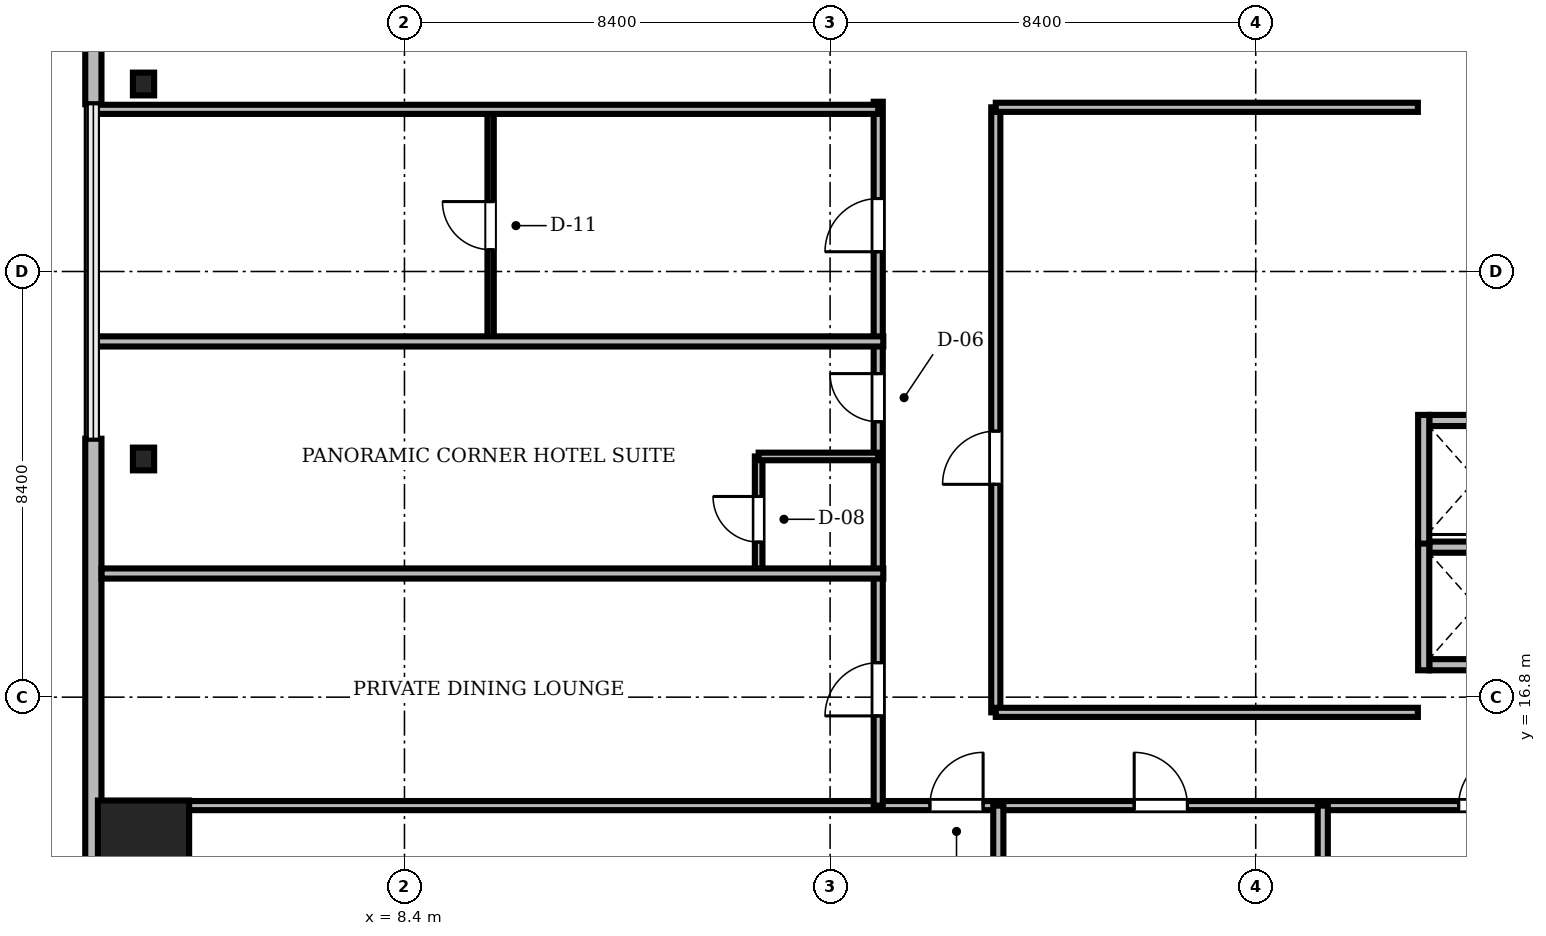
"""IFC4 building model, lengths in metres.
Left out: names, types, materials, properties, quantities, classifications, styles, units other than length and angle.
Written with IfcOpenShell. Run it as: python <this file> out.ifc"""

import sys

from ifc_helpers import new_model, si_unit, direction, frame, frame_2d, origin, origin_2d, place, context, subcontext, project, spatial, rectangle, i_section, extrude, source, transform, mapped, element, fill, save


model = new_model("IFC4")
c1 = context("Model", 3, precision=1e-05, world=origin(), true_north=direction((0.0, 1.0)))
c2 = subcontext(c1, "Body", "Model", "MODEL_VIEW")
j1 = project(units=[si_unit("LENGTHUNIT", "METRE"), si_unit("PLANEANGLEUNIT", "RADIAN")], contexts=[c1])
p1 = place(None, origin())
s1 = spatial("IfcSite", under=j1, at=p1, CompositionType="ELEMENT")
p2 = place(p1, origin())
s2 = spatial("IfcBuilding", under=s1, at=p2, CompositionType="ELEMENT")
p3 = place(p2, frame((0.0, 0.0, 27.6)))
s3 = spatial("IfcBuildingStorey", under=s2, at=p3, CompositionType="ELEMENT", Elevation=27.6)
m1 = source(origin(), c2, "Body", "SweptSolid", [
    extrude(rectangle(XDim=1.8, YDim=1.8, at=origin_2d()), origin(), (0.0, 0.0, 1.0), 3.41),
])
p4 = place(p3, frame((3.25, 13.86, 0.0), z_axis=(0.0, 0.0, 1.0), x_axis=(1.0, 0.0, 0.0)))
e1 = element("IfcColumn", 1, at=p4, inside=s3, PredefinedType="COLUMN", context=c2, shape_type="MappedRepresentation", body=[
    mapped(m1, transform((0.0, 0.0, 0.0), scale=1.0)),
])
m2 = source(origin(), c2, "Body", "SweptSolid", [
    extrude(i_section(OverallWidth=0.419, OverallDepth=0.449, WebThickness=0.031, FlangeThickness=0.048, FilletRadius=0.015, at=origin_2d()), origin(), (0.0, 0.0, 1.0), 3.41),
])
for number, where, z_axis, x_axis in (
    (2, (3.25, 28.9, 0.0), (0.0, 0.0, 1.0), (1.0, 0.0, 0.0)),
    (3, (3.25, 21.5, 0.0), (0.0, 0.0, 1.0), (1.0, 0.0, 0.0)),
):
    element("IfcColumn", number, at=place(p3, frame(where, z_axis=z_axis, x_axis=x_axis)), inside=s3, PredefinedType="COLUMN", context=c2, shape_type="MappedRepresentation", body=[
        mapped(m2, transform((0.0, 0.0, 0.0), scale=1.0)),
    ])
m3 = source(origin(), c2, "Body", "SweptSolid", [
    extrude(rectangle(XDim=15.6, YDim=0.32, at=frame_2d((7.8, 0.0))), origin(), (0.0, 0.0, 1.0), 3.41),
])
p5 = place(p3, frame((2.26, 44.1, 0.0), z_axis=(0.0, 0.0, 1.0), x_axis=(0.0, -1.0, 0.0)))
e4 = element("IfcWall", 4, at=p5, inside=s3, PredefinedType="SOLIDWALL", context=c2, shape_type="MappedRepresentation", body=[
    mapped(m3, transform((0.0, 0.0, 0.0), scale=1.0)),
])
m4 = source(origin(), c2, "Body", "SweptSolid", [
    extrude(rectangle(XDim=1.4, YDim=2.3, at=frame_2d((0.7, 1.15))), frame((0.0, 0.17, 0.0), z_axis=(0.0, -1.0, 0.0), x_axis=(1.0, 0.0, 0.0)), (0.0, 0.0, 1.0), 0.34),
])
p6 = place(p5, frame((9.61, 0.0, 0.0)))
e5 = element("IfcOpeningElement", 5, at=p6, cuts=e4, PredefinedType="OPENING", context=c2, shape_type="MappedRepresentation", body=[
    mapped(m4, transform((0.0, 0.0, 0.0), scale=1.0)),
])
m5 = source(origin(), c2, "Body", "SweptSolid", [
    extrude(rectangle(XDim=2.8, YDim=2.4, at=frame_2d((1.4, 1.2))), frame((0.0, 0.17, 0.0), z_axis=(0.0, -1.0, 0.0), x_axis=(1.0, 0.0, 0.0)), (0.0, 0.0, 1.0), 0.34),
])
p7 = place(p5, frame((2.705, 0.0, 0.72)))
e6 = element("IfcOpeningElement", 6, at=p7, cuts=e4, PredefinedType="OPENING", context=c2, shape_type="MappedRepresentation", body=[
    mapped(m5, transform((0.0, 0.0, 0.0), scale=1.0)),
])
m6 = source(origin(), c2, "Body", "SweptSolid", [
    extrude(rectangle(XDim=15.6, YDim=0.32, at=frame_2d((7.8, 0.0))), origin(), (0.0, 0.0, 1.0), 3.41),
])
p8 = place(p3, frame((2.26, 21.9, 0.0), z_axis=(0.0, 0.0, 1.0), x_axis=(0.0, -1.0, 0.0)))
e7 = element("IfcWall", 7, at=p8, inside=s3, PredefinedType="SOLIDWALL", context=c2, shape_type="MappedRepresentation", body=[
    mapped(m6, transform((0.0, 0.0, 0.0), scale=1.0)),
])
p9 = place(p8, frame((10.095, 0.0, 0.72)))
e8 = element("IfcOpeningElement", 8, at=p9, cuts=e7, PredefinedType="OPENING", context=c2, shape_type="MappedRepresentation", body=[
    mapped(m5, transform((0.0, 0.0, 0.0), scale=1.0)),
])
m7 = source(origin(), c2, "Body", "SweptSolid", [
    extrude(rectangle(XDim=1.85, YDim=0.22, at=frame_2d((0.925, 0.0))), origin(), (0.0, 0.0, 1.0), 3.41),
])
for number, where, z_axis, x_axis in (
    (9, (28.625, 17.44, 0.0), (0.0, 0.0, 1.0), (1.0, 0.0, 0.0)),
    (10, (28.625, 19.76, 0.0), (0.0, 0.0, 1.0), (1.0, 0.0, 0.0)),
):
    element("IfcWall", number, at=place(p3, frame(where, z_axis=z_axis, x_axis=x_axis)), inside=s3, PredefinedType="SOLIDWALL", context=c2, shape_type="MappedRepresentation", body=[
        mapped(m7, transform((0.0, 0.0, 0.0), scale=1.0)),
    ])
m8 = source(origin(), c2, "Body", "SweptSolid", [
    extrude(rectangle(XDim=2.54, YDim=0.22, at=frame_2d((1.27, 0.0))), origin(), (0.0, 0.0, 1.0), 3.41),
])
p10 = place(p3, frame((28.515, 17.33, 0.0), z_axis=(0.0, 0.0, 1.0), x_axis=(0.0, 1.0, 0.0)))
e11 = element("IfcWall", 11, at=p10, inside=s3, PredefinedType="SOLIDWALL", context=c2, shape_type="MappedRepresentation", body=[
    mapped(m8, transform((0.0, 0.0, 0.0), scale=1.0)),
])
p11 = place(p3, frame((28.625, 22.26, 0.0), z_axis=(0.0, 0.0, 1.0), x_axis=(1.0, 0.0, 0.0)))
e12 = element("IfcWall", 12, at=p11, inside=s3, PredefinedType="SOLIDWALL", context=c2, shape_type="MappedRepresentation", body=[
    mapped(m7, transform((0.0, 0.0, 0.0), scale=1.0)),
])
p12 = place(p3, frame((28.515, 19.83, 0.0), z_axis=(0.0, 0.0, 1.0), x_axis=(0.0, 1.0, 0.0)))
e13 = element("IfcWall", 13, at=p12, inside=s3, PredefinedType="SOLIDWALL", context=c2, shape_type="MappedRepresentation", body=[
    mapped(m8, transform((0.0, 0.0, 0.0), scale=1.0)),
])
m9 = source(origin(), c2, "Body", "SweptSolid", [
    extrude(rectangle(XDim=46.156, YDim=0.18, at=frame_2d((23.078, 0.0))), origin(), (0.0, 0.0, 1.0), 2.652),
])
p13 = place(p3, frame((2.422, 14.66, 0.0), z_axis=(0.0, 0.0, 1.0), x_axis=(1.0, 0.0, 0.0)))
e14 = element("IfcWall", 14, at=p13, inside=s3, PredefinedType="PARTITIONING", context=c2, shape_type="MappedRepresentation", body=[
    mapped(m9, transform((0.0, 0.0, 0.0), scale=1.0)),
])
m10 = source(origin(), c2, "Body", "SweptSolid", [
    extrude(rectangle(XDim=1.05, YDim=2.2, at=frame_2d((0.525, 1.1))), frame((0.0, 0.1, 0.0), z_axis=(0.0, -1.0, 0.0), x_axis=(1.0, 0.0, 0.0)), (0.0, 0.0, 1.0), 0.2),
])
p14 = place(p13, frame((16.348, 0.0, 0.0)))
e15 = element("IfcOpeningElement", 15, at=p14, cuts=e14, PredefinedType="OPENING", context=c2, shape_type="MappedRepresentation", body=[
    mapped(m10, transform((0.0, 0.0, 0.0), scale=1.0)),
])
p15 = place(p13, frame((20.38, 0.0, 0.0)))
e16 = element("IfcOpeningElement", 16, at=p15, cuts=e14, PredefinedType="OPENING", context=c2, shape_type="MappedRepresentation", body=[
    mapped(m10, transform((0.0, 0.0, 0.0), scale=1.0)),
])
p16 = place(p13, frame((26.783, 0.0, 0.0)))
e17 = element("IfcOpeningElement", 17, at=p16, cuts=e14, PredefinedType="OPENING", context=c2, shape_type="MappedRepresentation", body=[
    mapped(m10, transform((0.0, 0.0, 0.0), scale=1.0)),
])
p17 = place(p13, frame((33.186, 0.0, 0.0)))
e18 = element("IfcOpeningElement", 18, at=p17, cuts=e14, PredefinedType="OPENING", context=c2, shape_type="MappedRepresentation", body=[
    mapped(m10, transform((0.0, 0.0, 0.0), scale=1.0)),
])
p18 = place(p13, frame((40.998, 0.0, 0.0)))
e19 = element("IfcOpeningElement", 19, at=p18, cuts=e14, PredefinedType="OPENING", context=c2, shape_type="MappedRepresentation", body=[
    mapped(m10, transform((0.0, 0.0, 0.0), scale=1.0)),
])
m11 = source(origin(), c2, "Body", "SweptSolid", [
    extrude(rectangle(XDim=13.89, YDim=0.18, at=frame_2d((6.945, 0.0))), origin(), (0.0, 0.0, 1.0), 2.802),
])
p19 = place(p3, frame((17.75, 14.66, 0.0), z_axis=(0.0, 0.0, 1.0), x_axis=(0.0, 1.0, 0.0)))
e20 = element("IfcWall", 20, at=p19, inside=s3, PredefinedType="PARTITIONING", context=c2, shape_type="MappedRepresentation", body=[
    mapped(m11, transform((0.0, 0.0, 0.0), scale=1.0)),
])
p20 = place(p19, frame((1.77, 0.0, 0.0)))
e21 = element("IfcOpeningElement", 21, at=p20, cuts=e20, PredefinedType="OPENING", context=c2, shape_type="MappedRepresentation", body=[
    mapped(m10, transform((0.0, 0.0, 0.0), scale=1.0)),
])
m12 = source(origin(), c2, "Body", "SweptSolid", [
    extrude(rectangle(XDim=0.95, YDim=2.15, at=frame_2d((0.475, 1.075))), frame((0.0, 0.1, 0.0), z_axis=(0.0, -1.0, 0.0), x_axis=(1.0, 0.0, 0.0)), (0.0, 0.0, 1.0), 0.2),
])
p21 = place(p19, frame((7.575, 0.0, 0.0)))
e22 = element("IfcOpeningElement", 22, at=p21, cuts=e20, PredefinedType="OPENING", context=c2, shape_type="MappedRepresentation", body=[
    mapped(m12, transform((0.0, 0.0, 0.0), scale=1.0)),
])
p22 = place(p19, frame((10.93, 0.0, 0.0)))
e23 = element("IfcOpeningElement", 23, at=p22, cuts=e20, PredefinedType="OPENING", context=c2, shape_type="MappedRepresentation", body=[
    mapped(m10, transform((0.0, 0.0, 0.0), scale=1.0)),
])
m13 = source(origin(), c2, "Body", "SweptSolid", [
    extrude(rectangle(XDim=11.94, YDim=0.18, at=frame_2d((5.97, 0.0))), origin(), (0.0, 0.0, 1.0), 2.802),
])
p23 = place(p3, frame((20.07, 16.5, 0.0), z_axis=(0.0, 0.0, 1.0), x_axis=(0.0, 1.0, 0.0)))
e24 = element("IfcWall", 24, at=p23, inside=s3, PredefinedType="PARTITIONING", context=c2, shape_type="MappedRepresentation", body=[
    mapped(m13, transform((0.0, 0.0, 0.0), scale=1.0)),
])
p24 = place(p23, frame((4.5, 0.0, 0.0)))
e25 = element("IfcOpeningElement", 25, at=p24, cuts=e24, PredefinedType="OPENING", context=c2, shape_type="MappedRepresentation", body=[
    mapped(m10, transform((0.0, 0.0, 0.0), scale=1.0)),
])
m14 = source(origin(), c2, "Body", "SweptSolid", [
    extrude(rectangle(XDim=4.58, YDim=0.125, at=frame_2d((2.29, 0.0))), origin(), (0.0, 0.0, 1.0), 2.802),
])
p25 = place(p3, frame((10.1, 23.82, 0.0), z_axis=(0.0, 0.0, 1.0), x_axis=(0.0, 1.0, 0.0)))
e26 = element("IfcWall", 26, at=p25, inside=s3, PredefinedType="PARTITIONING", context=c2, shape_type="MappedRepresentation", body=[
    mapped(m14, transform((0.0, 0.0, 0.0), scale=1.0)),
])
m15 = source(origin(), c2, "Body", "SweptSolid", [
    extrude(rectangle(XDim=0.95, YDim=2.15, at=frame_2d((0.475, 1.075))), frame((0.0, 0.073, 0.0), z_axis=(0.0, -1.0, 0.0), x_axis=(1.0, 0.0, 0.0)), (0.0, 0.0, 1.0), 0.145),
])
p26 = place(p25, frame((1.81, 0.0, 0.0)))
e27 = element("IfcOpeningElement", 27, at=p26, cuts=e26, PredefinedType="OPENING", context=c2, shape_type="MappedRepresentation", body=[
    mapped(m15, transform((0.0, 0.0, 0.0), scale=1.0)),
])
m16 = source(origin(), c2, "Body", "SweptSolid", [
    extrude(rectangle(XDim=2.29, YDim=0.15, at=frame_2d((1.145, 0.0))), origin(), (0.0, 0.0, 1.0), 2.802),
])
p27 = place(p3, frame((15.39, 19.26, 0.0), z_axis=(0.0, 0.0, 1.0), x_axis=(0.0, 1.0, 0.0)))
e28 = element("IfcWall", 28, at=p27, inside=s3, PredefinedType="PARTITIONING", context=c2, shape_type="MappedRepresentation", body=[
    mapped(m16, transform((0.0, 0.0, 0.0), scale=1.0)),
])
m17 = source(origin(), c2, "Body", "SweptSolid", [
    extrude(rectangle(XDim=0.9, YDim=2.1, at=frame_2d((0.45, 1.05))), frame((0.0, 0.085, 0.0), z_axis=(0.0, -1.0, 0.0), x_axis=(1.0, 0.0, 0.0)), (0.0, 0.0, 1.0), 0.17),
])
p28 = place(p27, frame((0.6, 0.0, 0.0)))
e29 = element("IfcOpeningElement", 29, at=p28, cuts=e28, PredefinedType="OPENING", context=c2, shape_type="MappedRepresentation", body=[
    mapped(m17, transform((0.0, 0.0, 0.0), scale=1.0)),
])
m18 = source(origin(), c2, "Body", "SweptSolid", [
    extrude(rectangle(XDim=15.428, YDim=0.2, at=frame_2d((7.714, 0.0))), origin(), (0.0, 0.0, 1.0), 2.652),
])
p29 = place(p3, frame((2.422, 19.24, 0.0), z_axis=(0.0, 0.0, 1.0), x_axis=(1.0, 0.0, 0.0)))
e30 = element("IfcWall", 30, at=p29, inside=s3, PredefinedType="PARTITIONING", context=c2, shape_type="MappedRepresentation", body=[
    mapped(m18, transform((0.0, 0.0, 0.0), scale=1.0)),
])
m19 = source(origin(), c2, "Body", "SweptSolid", [
    extrude(rectangle(XDim=15.62, YDim=0.2, at=frame_2d((7.81, 0.0))), origin(), (0.0, 0.0, 1.0), 2.652),
])
p30 = place(p3, frame((2.23, 23.82, 0.0), z_axis=(0.0, 0.0, 1.0), x_axis=(1.0, 0.0, 0.0)))
e31 = element("IfcWall", 31, at=p30, inside=s3, PredefinedType="PARTITIONING", context=c2, shape_type="MappedRepresentation", body=[
    mapped(m19, transform((0.0, 0.0, 0.0), scale=1.0)),
])
m20 = source(origin(), c2, "Body", "SweptSolid", [
    extrude(rectangle(XDim=15.52, YDim=0.18, at=frame_2d((7.76, 0.0))), origin(), (0.0, 0.0, 1.0), 2.652),
])
p31 = place(p3, frame((2.23, 28.4, 0.0), z_axis=(0.0, 0.0, 1.0), x_axis=(1.0, 0.0, 0.0)))
e32 = element("IfcWall", 32, at=p31, inside=s3, PredefinedType="PARTITIONING", context=c2, shape_type="MappedRepresentation", body=[
    mapped(m20, transform((0.0, 0.0, 0.0), scale=1.0)),
])
m21 = source(origin(), c2, "Body", "SweptSolid", [
    extrude(rectangle(XDim=12.538, YDim=0.2, at=frame_2d((6.269, 0.0))), origin(), (0.0, 0.0, 1.0), 2.652),
])
p32 = place(p3, frame((20.12, 2.122, 0.0), z_axis=(0.0, 0.0, 1.0), x_axis=(0.0, 1.0, 0.0)))
e33 = element("IfcWall", 33, at=p32, inside=s3, PredefinedType="PARTITIONING", context=c2, shape_type="MappedRepresentation", body=[
    mapped(m21, transform((0.0, 0.0, 0.0), scale=1.0)),
])
m22 = source(origin(), c2, "Body", "SweptSolid", [
    extrude(rectangle(XDim=12.73, YDim=0.2, at=frame_2d((6.365, 0.0))), origin(), (0.0, 0.0, 1.0), 2.652),
])
p33 = place(p3, frame((26.523, 1.93, 0.0), z_axis=(0.0, 0.0, 1.0), x_axis=(0.0, 1.0, 0.0)))
e34 = element("IfcWall", 34, at=p33, inside=s3, PredefinedType="PARTITIONING", context=c2, shape_type="MappedRepresentation", body=[
    mapped(m22, transform((0.0, 0.0, 0.0), scale=1.0)),
])
m23 = source(origin(), c2, "Body", "SweptSolid", [
    extrude(rectangle(XDim=8.33, YDim=0.18, at=frame_2d((4.165, 0.0))), origin(), (0.0, 0.0, 1.0), 2.802),
])
p34 = place(p3, frame((20.07, 16.5, 0.0), z_axis=(0.0, 0.0, 1.0), x_axis=(1.0, 0.0, 0.0)))
e35 = element("IfcWall", 35, at=p34, inside=s3, PredefinedType="PARTITIONING", context=c2, shape_type="MappedRepresentation", body=[
    mapped(m23, transform((0.0, 0.0, 0.0), scale=1.0)),
])
m24 = source(origin(), c2, "Body", "SweptSolid", [
    extrude(rectangle(XDim=8.33, YDim=0.18, at=frame_2d((4.165, 0.0))), origin(), (0.0, 0.0, 1.0), 3.41),
])
p35 = place(p3, frame((20.07, 28.44, 0.0), z_axis=(0.0, 0.0, 1.0), x_axis=(1.0, 0.0, 0.0)))
e36 = element("IfcWall", 36, at=p35, inside=s3, PredefinedType="PARTITIONING", context=c2, shape_type="MappedRepresentation", body=[
    mapped(m24, transform((0.0, 0.0, 0.0), scale=1.0)),
])
m25 = source(origin(), c2, "Body", "SweptSolid", [
    extrude(rectangle(XDim=2.36, YDim=0.15, at=frame_2d((1.18, 0.0))), origin(), (0.0, 0.0, 1.0), 3.41),
])
p36 = place(p3, frame((15.39, 21.55, 0.0), z_axis=(0.0, 0.0, 1.0), x_axis=(1.0, 0.0, 0.0)))
e37 = element("IfcWall", 37, at=p36, inside=s3, PredefinedType="PARTITIONING", context=c2, shape_type="MappedRepresentation", body=[
    mapped(m25, transform((0.0, 0.0, 0.0), scale=1.0)),
])
m26 = source(origin(), c2, "Body", "SweptSolid", [
    extrude(rectangle(XDim=1.05, YDim=2.2, at=frame_2d((0.525, 1.1))), frame((0.0, 0.025, 0.0), z_axis=(0.0, -1.0, 0.0), x_axis=(1.0, 0.0, 0.0)), (0.0, 0.0, 1.0), 0.05),
])
p37 = place(p14, origin())
e38 = element("IfcDoor", 38, at=p37, inside=s3, OperationType="SINGLE_SWING_RIGHT", PredefinedType="DOOR", context=c2, shape_type="MappedRepresentation", body=[
    mapped(m26, transform((0.0, 0.0, 0.0), scale=1.0)),
])
fill(e15, e38)
p38 = place(p15, origin())
e39 = element("IfcDoor", 39, at=p38, inside=s3, OperationType="SINGLE_SWING_LEFT", PredefinedType="DOOR", context=c2, shape_type="MappedRepresentation", body=[
    mapped(m26, transform((0.0, 0.0, 0.0), scale=1.0)),
])
fill(e16, e39)
p39 = place(p16, origin())
e40 = element("IfcDoor", 40, at=p39, inside=s3, OperationType="SINGLE_SWING_RIGHT", PredefinedType="DOOR", context=c2, shape_type="MappedRepresentation", body=[
    mapped(m26, transform((0.0, 0.0, 0.0), scale=1.0)),
])
fill(e17, e40)
p40 = place(p20, origin())
e41 = element("IfcDoor", 41, at=p40, inside=s3, OperationType="SINGLE_SWING_LEFT", PredefinedType="DOOR", context=c2, shape_type="MappedRepresentation", body=[
    mapped(m26, transform((0.0, 0.0, 0.0), scale=1.0)),
])
fill(e21, e41)
m27 = source(origin(), c2, "Body", "SweptSolid", [
    extrude(rectangle(XDim=0.95, YDim=2.15, at=frame_2d((0.475, 1.075))), frame((0.0, 0.025, 0.0), z_axis=(0.0, -1.0, 0.0), x_axis=(1.0, 0.0, 0.0)), (0.0, 0.0, 1.0), 0.05),
])
p41 = place(p21, origin())
e42 = element("IfcDoor", 42, at=p41, inside=s3, OperationType="SINGLE_SWING_RIGHT", PredefinedType="DOOR", context=c2, shape_type="MappedRepresentation", body=[
    mapped(m27, transform((0.0, 0.0, 0.0), scale=1.0)),
])
fill(e22, e42)
p42 = place(p22, origin())
e43 = element("IfcDoor", 43, at=p42, inside=s3, OperationType="SINGLE_SWING_LEFT", PredefinedType="DOOR", context=c2, shape_type="MappedRepresentation", body=[
    mapped(m26, transform((0.0, 0.0, 0.0), scale=1.0)),
])
fill(e23, e43)
p43 = place(p24, origin())
e44 = element("IfcDoor", 44, at=p43, inside=s3, OperationType="SINGLE_SWING_LEFT", PredefinedType="DOOR", context=c2, shape_type="MappedRepresentation", body=[
    mapped(m26, transform((0.0, 0.0, 0.0), scale=1.0)),
])
fill(e25, e44)
p44 = place(p26, origin())
e45 = element("IfcDoor", 45, at=p44, inside=s3, OperationType="SINGLE_SWING_RIGHT", PredefinedType="DOOR", context=c2, shape_type="MappedRepresentation", body=[
    mapped(m27, transform((0.0, 0.0, 0.0), scale=1.0)),
])
fill(e27, e45)
m28 = source(origin(), c2, "Body", "SweptSolid", [
    extrude(rectangle(XDim=0.9, YDim=2.1, at=frame_2d((0.45, 1.05))), frame((0.0, 0.025, 0.0), z_axis=(0.0, -1.0, 0.0), x_axis=(1.0, 0.0, 0.0)), (0.0, 0.0, 1.0), 0.05),
])
p45 = place(p28, origin())
e46 = element("IfcDoor", 46, at=p45, inside=s3, OperationType="SINGLE_SWING_RIGHT", PredefinedType="DOOR", context=c2, shape_type="MappedRepresentation", body=[
    mapped(m28, transform((0.0, 0.0, 0.0), scale=1.0)),
])
fill(e29, e46)
save(model, sys.argv[1])
